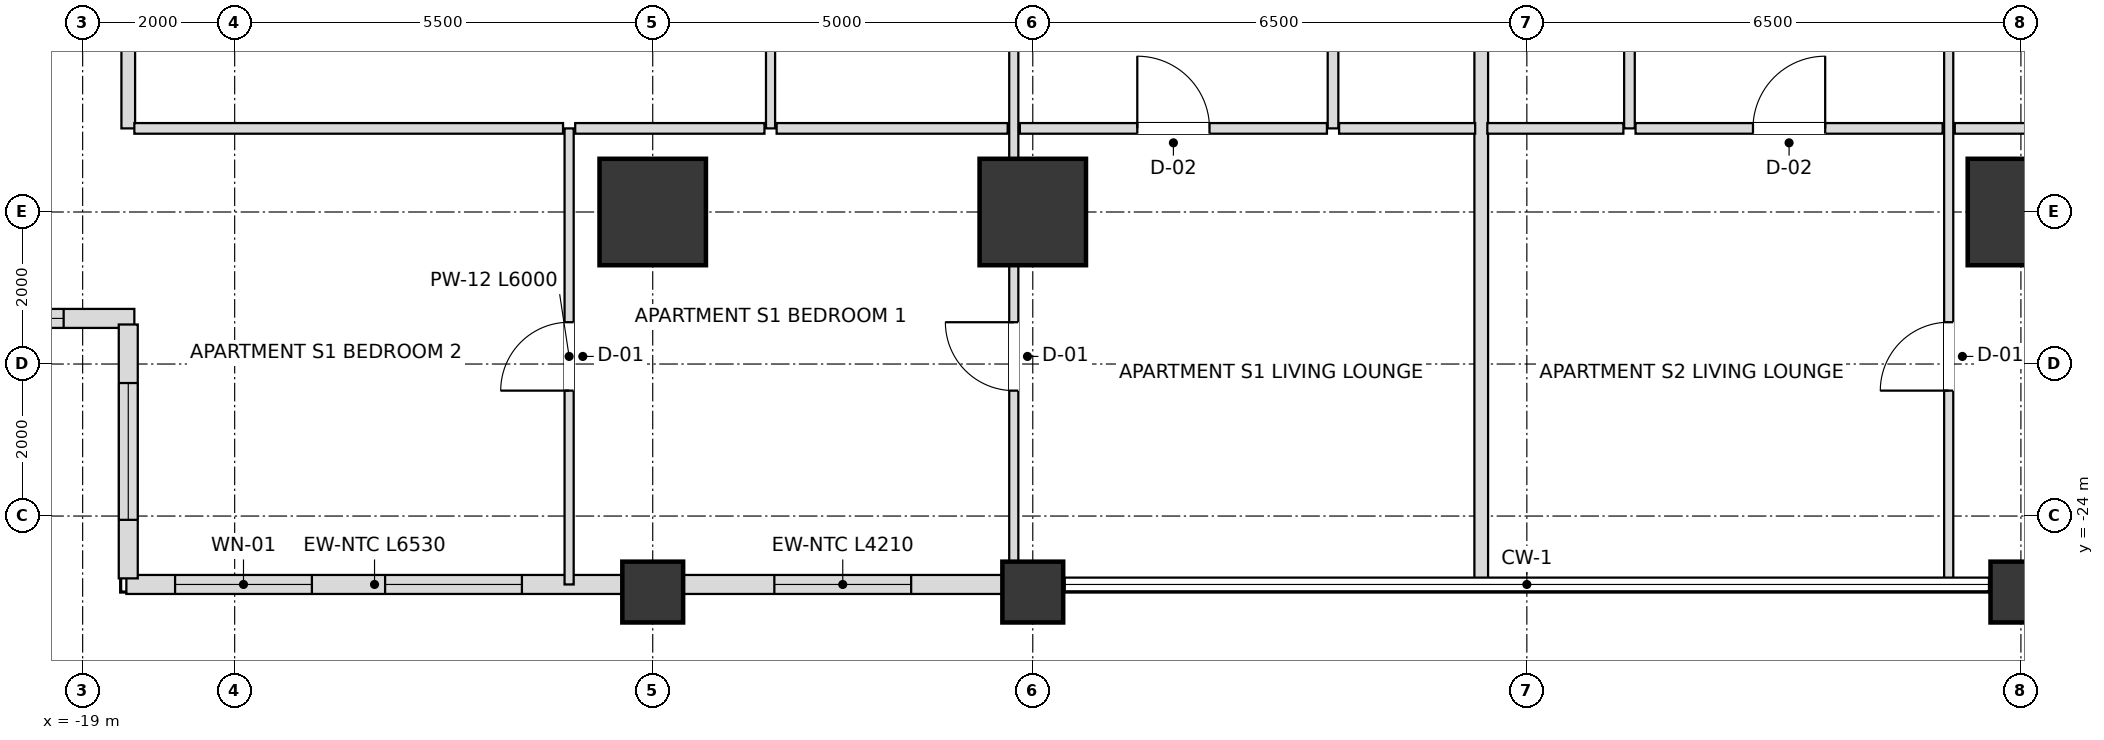
"""IFC4 building model, lengths in metres.
Left out: names, types, materials, properties, quantities, classifications, styles, units other than length and angle.
Written with IfcOpenShell. Run it as: python <this file> out.ifc"""

import sys

from ifc_helpers import new_model, si_unit, direction, frame, frame_2d, origin, origin_2d, place, context, subcontext, project, spatial, rectangle, extrude, element, fill, save


model = new_model("IFC4")
c1 = context("Model", 3, precision=1e-05, world=origin(), true_north=direction((0.0, 1.0)))
c2 = subcontext(c1, "Body", "Model", "MODEL_VIEW")
j1 = project(units=[si_unit("LENGTHUNIT", "METRE"), si_unit("PLANEANGLEUNIT", "RADIAN")], contexts=[c1])
p1 = place(None, origin())
s1 = spatial("IfcSite", under=j1, at=p1, CompositionType="ELEMENT")
p2 = place(p1, origin())
s2 = spatial("IfcBuilding", under=s1, at=p2, CompositionType="ELEMENT")
p3 = place(p2, frame((0.0, 0.0, 68.4)))
s3 = spatial("IfcBuildingStorey", under=s2, at=p3, CompositionType="ELEMENT", Elevation=68.4)
for number, where, z_axis, x_axis in (
    (1, (-11.5, -20.0, 0.0), (0.0, 0.0, 1.0), (1.0, 0.0, 0.0)),
    (2, (-6.5, -20.0, 0.0), (0.0, 0.0, 1.0), (1.0, 0.0, 0.0)),
    (3, (6.5, -20.0, 0.0), (0.0, 0.0, 1.0), (1.0, 0.0, 0.0)),
):
    element("IfcColumn", number, at=place(p3, frame(where, z_axis=z_axis, x_axis=x_axis)), inside=s3, PredefinedType="USERDEFINED", context=c2, shape_type="SweptSolid", body=[
        extrude(rectangle(XDim=1.4, YDim=1.4, at=origin_2d()), origin(), (0.0, 0.0, 1.0), 3.6),
    ])
for number, where, z_axis, x_axis in (
    (4, (-11.5, -25.0, 0.0), (0.0, 0.0, 1.0), (1.0, 0.0, 0.0)),
    (5, (-6.5, -25.0, 0.0), (0.0, 0.0, 1.0), (1.0, 0.0, 0.0)),
    (6, (6.5, -25.0, 0.0), (0.0, 0.0, 1.0), (1.0, 0.0, 0.0)),
):
    element("IfcColumn", number, at=place(p3, frame(where, z_axis=z_axis, x_axis=x_axis)), inside=s3, PredefinedType="COLUMN", context=c2, shape_type="SweptSolid", body=[
        extrude(rectangle(XDim=0.8, YDim=0.8, at=origin_2d()), origin(), (0.0, 0.0, 1.0), 3.6),
    ])
p4 = place(p3, frame((-18.425, -24.9, 0.0), z_axis=(0.0, 0.0, 1.0), x_axis=(1.0, 0.0, 0.0)))
e7 = element("IfcWall", 7, at=p4, inside=s3, PredefinedType="SOLIDWALL", context=c2, shape_type="SweptSolid", body=[
    extrude(rectangle(XDim=6.53, YDim=0.25, at=frame_2d((3.265, 0.0))), origin(), (0.0, 0.0, 1.0), 2.736),
])
p5 = place(p4, frame((0.641, 0.0, 0.72)))
e8 = element("IfcOpeningElement", 8, at=p5, cuts=e7, PredefinedType="OPENING", context=c2, shape_type="SweptSolid", body=[
    extrude(rectangle(XDim=1.8, YDim=1.68, at=frame_2d((0.9, 0.84))), frame((0.0, 0.135, 0.0), z_axis=(0.0, -1.0, 0.0), x_axis=(1.0, 0.0, 0.0)), (0.0, 0.0, 1.0), 0.27),
])
p6 = place(p4, frame((3.404, 0.0, 0.72)))
e9 = element("IfcOpeningElement", 9, at=p6, cuts=e7, PredefinedType="OPENING", context=c2, shape_type="SweptSolid", body=[
    extrude(rectangle(XDim=1.8, YDim=1.68, at=frame_2d((0.9, 0.84))), frame((0.0, 0.135, 0.0), z_axis=(0.0, -1.0, 0.0), x_axis=(1.0, 0.0, 0.0)), (0.0, 0.0, 1.0), 0.27),
])
p7 = place(p3, frame((-11.105, -24.9, 0.0), z_axis=(0.0, 0.0, 1.0), x_axis=(1.0, 0.0, 0.0)))
e10 = element("IfcWall", 10, at=p7, inside=s3, PredefinedType="SOLIDWALL", context=c2, shape_type="SweptSolid", body=[
    extrude(rectangle(XDim=4.21, YDim=0.25, at=frame_2d((2.105, 0.0))), origin(), (0.0, 0.0, 1.0), 2.736),
])
p8 = place(p7, frame((1.205, 0.0, 0.72)))
e11 = element("IfcOpeningElement", 11, at=p8, cuts=e10, PredefinedType="OPENING", context=c2, shape_type="SweptSolid", body=[
    extrude(rectangle(XDim=1.8, YDim=1.68, at=frame_2d((0.9, 0.84))), frame((0.0, 0.135, 0.0), z_axis=(0.0, -1.0, 0.0), x_axis=(1.0, 0.0, 0.0)), (0.0, 0.0, 1.0), 0.27),
])
p9 = place(p3, frame((-21.98, -21.4, 0.0), z_axis=(0.0, 0.0, 1.0), x_axis=(1.0, 0.0, 0.0)))
e12 = element("IfcWall", 12, at=p9, inside=s3, PredefinedType="SOLIDWALL", context=c2, shape_type="SweptSolid", body=[
    extrude(rectangle(XDim=3.66, YDim=0.25, at=frame_2d((1.83, 0.0))), origin(), (0.0, 0.0, 1.0), 2.736),
])
p10 = place(p9, frame((0.93, 0.0, 0.72)))
e13 = element("IfcOpeningElement", 13, at=p10, cuts=e12, PredefinedType="OPENING", context=c2, shape_type="SweptSolid", body=[
    extrude(rectangle(XDim=1.8, YDim=1.68, at=frame_2d((0.9, 0.84))), frame((0.0, 0.135, 0.0), z_axis=(0.0, -1.0, 0.0), x_axis=(1.0, 0.0, 0.0)), (0.0, 0.0, 1.0), 0.27),
])
p11 = place(p3, frame((-18.4, -21.48, 0.0), z_axis=(0.0, 0.0, 1.0), x_axis=(0.0, -1.0, 0.0)))
e14 = element("IfcWall", 14, at=p11, inside=s3, PredefinedType="SOLIDWALL", context=c2, shape_type="SweptSolid", body=[
    extrude(rectangle(XDim=3.34, YDim=0.25, at=frame_2d((1.67, 0.0))), origin(), (0.0, 0.0, 1.0), 2.736),
])
p12 = place(p11, frame((0.77, 0.0, 0.72)))
e15 = element("IfcOpeningElement", 15, at=p12, cuts=e14, PredefinedType="OPENING", context=c2, shape_type="SweptSolid", body=[
    extrude(rectangle(XDim=1.8, YDim=1.68, at=frame_2d((0.9, 0.84))), frame((0.0, 0.135, 0.0), z_axis=(0.0, -1.0, 0.0), x_axis=(1.0, 0.0, 0.0)), (0.0, 0.0, 1.0), 0.27),
])
p13 = place(p3, frame((-18.4, -18.9, 0.0), z_axis=(0.0, 0.0, 1.0), x_axis=(0.0, 1.0, 0.0)))
e16 = element("IfcWall", 16, at=p13, inside=s3, PredefinedType="PARTITIONING", context=c2, shape_type="SweptSolid", body=[
    extrude(rectangle(XDim=9.6, YDim=0.18, at=frame_2d((4.8, 0.0))), origin(), (0.0, 0.0, 1.0), 2.736),
])
p14 = place(p3, frame((-12.6, -24.9, 0.0), z_axis=(0.0, 0.0, 1.0), x_axis=(0.0, 1.0, 0.0)))
e17 = element("IfcWall", 17, at=p14, inside=s3, PredefinedType="PARTITIONING", context=c2, shape_type="SweptSolid", body=[
    extrude(rectangle(XDim=6.0, YDim=0.12, at=frame_2d((3.0, 0.0))), origin(), (0.0, 0.0, 1.0), 2.736),
])
p15 = place(p14, frame((2.55, 0.0, 0.0)))
e18 = element("IfcOpeningElement", 18, at=p15, cuts=e17, PredefinedType="OPENING", context=c2, shape_type="SweptSolid", body=[
    extrude(rectangle(XDim=0.9, YDim=2.1, at=frame_2d((0.45, 1.05))), frame((0.0, 0.07, 0.0), z_axis=(0.0, -1.0, 0.0), x_axis=(1.0, 0.0, 0.0)), (0.0, 0.0, 1.0), 0.14),
])
p16 = place(p3, frame((-9.95, -18.9, 0.0), z_axis=(0.0, 0.0, 1.0), x_axis=(0.0, 1.0, 0.0)))
e19 = element("IfcWall", 19, at=p16, inside=s3, PredefinedType="PARTITIONING", context=c2, shape_type="SweptSolid", body=[
    extrude(rectangle(XDim=9.6, YDim=0.12, at=frame_2d((4.8, 0.0))), origin(), (0.0, 0.0, 1.0), 2.816),
])
p17 = place(p16, frame((4.35, 0.0, 0.0)))
e20 = element("IfcOpeningElement", 20, at=p17, cuts=e19, PredefinedType="OPENING", context=c2, shape_type="SweptSolid", body=[
    extrude(rectangle(XDim=0.9, YDim=2.1, at=frame_2d((0.45, 1.05))), frame((0.0, 0.07, 0.0), z_axis=(0.0, -1.0, 0.0), x_axis=(1.0, 0.0, 0.0)), (0.0, 0.0, 1.0), 0.14),
])
p18 = place(p3, frame((-6.75, -24.9, 0.0), z_axis=(0.0, 0.0, 1.0), x_axis=(0.0, 1.0, 0.0)))
e21 = element("IfcWall", 21, at=p18, inside=s3, PredefinedType="PARTITIONING", context=c2, shape_type="SweptSolid", body=[
    extrude(rectangle(XDim=15.6, YDim=0.12, at=frame_2d((7.8, 0.0))), origin(), (0.0, 0.0, 1.0), 2.816),
])
p19 = place(p18, frame((10.325, 0.0, 0.0)))
e22 = element("IfcOpeningElement", 22, at=p19, cuts=e21, PredefinedType="OPENING", context=c2, shape_type="SweptSolid", body=[
    extrude(rectangle(XDim=0.95, YDim=2.1, at=frame_2d((0.475, 1.05))), frame((0.0, 0.07, 0.0), z_axis=(0.0, -1.0, 0.0), x_axis=(1.0, 0.0, 0.0)), (0.0, 0.0, 1.0), 0.14),
])
p20 = place(p18, frame((2.55, 0.0, 0.0)))
e23 = element("IfcOpeningElement", 23, at=p20, cuts=e21, PredefinedType="OPENING", context=c2, shape_type="SweptSolid", body=[
    extrude(rectangle(XDim=0.9, YDim=2.1, at=frame_2d((0.45, 1.05))), frame((0.0, 0.07, 0.0), z_axis=(0.0, -1.0, 0.0), x_axis=(1.0, 0.0, 0.0)), (0.0, 0.0, 1.0), 0.14),
])
p21 = place(p3, frame((-2.55, -18.9, 0.0), z_axis=(0.0, 0.0, 1.0), x_axis=(0.0, 1.0, 0.0)))
e24 = element("IfcWall", 24, at=p21, inside=s3, PredefinedType="PARTITIONING", context=c2, shape_type="SweptSolid", body=[
    extrude(rectangle(XDim=9.6, YDim=0.14, at=frame_2d((4.8, 0.0))), origin(), (0.0, 0.0, 1.0), 2.948),
])
p22 = place(p21, frame((4.35, 0.0, 0.0)))
e25 = element("IfcOpeningElement", 25, at=p22, cuts=e24, PredefinedType="OPENING", context=c2, shape_type="SweptSolid", body=[
    extrude(rectangle(XDim=0.9, YDim=2.1, at=frame_2d((0.45, 1.05))), frame((0.0, 0.08, 0.0), z_axis=(0.0, -1.0, 0.0), x_axis=(1.0, 0.0, 0.0)), (0.0, 0.0, 1.0), 0.16),
])
p23 = place(p3, frame((-0.6, -24.9, 0.0), z_axis=(0.0, 0.0, 1.0), x_axis=(0.0, 1.0, 0.0)))
e26 = element("IfcWall", 26, at=p23, inside=s3, PredefinedType="PARTITIONING", context=c2, shape_type="SweptSolid", body=[
    extrude(rectangle(XDim=15.6, YDim=0.18, at=frame_2d((7.8, 0.0))), origin(), (0.0, 0.0, 1.0), 2.816),
])
p24 = place(p3, frame((1.35, -18.9, 0.0), z_axis=(0.0, 0.0, 1.0), x_axis=(0.0, 1.0, 0.0)))
e27 = element("IfcWall", 27, at=p24, inside=s3, PredefinedType="PARTITIONING", context=c2, shape_type="SweptSolid", body=[
    extrude(rectangle(XDim=9.6, YDim=0.14, at=frame_2d((4.8, 0.0))), origin(), (0.0, 0.0, 1.0), 2.948),
])
p25 = place(p24, frame((4.35, 0.0, 0.0)))
e28 = element("IfcOpeningElement", 28, at=p25, cuts=e27, PredefinedType="OPENING", context=c2, shape_type="SweptSolid", body=[
    extrude(rectangle(XDim=0.9, YDim=2.1, at=frame_2d((0.45, 1.05))), frame((0.0, 0.08, 0.0), z_axis=(0.0, -1.0, 0.0), x_axis=(1.0, 0.0, 0.0)), (0.0, 0.0, 1.0), 0.16),
])
p26 = place(p3, frame((5.55, -24.9, 0.0), z_axis=(0.0, 0.0, 1.0), x_axis=(0.0, 1.0, 0.0)))
e29 = element("IfcWall", 29, at=p26, inside=s3, PredefinedType="PARTITIONING", context=c2, shape_type="SweptSolid", body=[
    extrude(rectangle(XDim=15.6, YDim=0.12, at=frame_2d((7.8, 0.0))), origin(), (0.0, 0.0, 1.0), 2.816),
])
p27 = place(p26, frame((10.325, 0.0, 0.0)))
e30 = element("IfcOpeningElement", 30, at=p27, cuts=e29, PredefinedType="OPENING", context=c2, shape_type="SweptSolid", body=[
    extrude(rectangle(XDim=0.95, YDim=2.1, at=frame_2d((0.475, 1.05))), frame((0.0, 0.07, 0.0), z_axis=(0.0, -1.0, 0.0), x_axis=(1.0, 0.0, 0.0)), (0.0, 0.0, 1.0), 0.14),
])
p28 = place(p26, frame((2.55, 0.0, 0.0)))
e31 = element("IfcOpeningElement", 31, at=p28, cuts=e29, PredefinedType="OPENING", context=c2, shape_type="SweptSolid", body=[
    extrude(rectangle(XDim=0.9, YDim=2.1, at=frame_2d((0.45, 1.05))), frame((0.0, 0.07, 0.0), z_axis=(0.0, -1.0, 0.0), x_axis=(1.0, 0.0, 0.0)), (0.0, 0.0, 1.0), 0.14),
])
p29 = place(p3, frame((-18.32, -18.9, 0.0), z_axis=(0.0, 0.0, 1.0), x_axis=(1.0, 0.0, 0.0)))
e32 = element("IfcWall", 32, at=p29, inside=s3, PredefinedType="PARTITIONING", context=c2, shape_type="SweptSolid", body=[
    extrude(rectangle(XDim=5.64, YDim=0.14, at=frame_2d((2.82, 0.0))), origin(), (0.0, 0.0, 1.0), 2.736),
])
p30 = place(p3, frame((-12.52, -18.9, 0.0), z_axis=(0.0, 0.0, 1.0), x_axis=(1.0, 0.0, 0.0)))
e33 = element("IfcWall", 33, at=p30, inside=s3, PredefinedType="PARTITIONING", context=c2, shape_type="SweptSolid", body=[
    extrude(rectangle(XDim=2.49, YDim=0.14, at=frame_2d((1.245, 0.0))), origin(), (0.0, 0.0, 1.0), 2.736),
])
p31 = place(p3, frame((-9.87, -18.9, 0.0), z_axis=(0.0, 0.0, 1.0), x_axis=(1.0, 0.0, 0.0)))
e34 = element("IfcWall", 34, at=p31, inside=s3, PredefinedType="PARTITIONING", context=c2, shape_type="SweptSolid", body=[
    extrude(rectangle(XDim=3.04, YDim=0.14, at=frame_2d((1.52, 0.0))), origin(), (0.0, 0.0, 1.0), 3.38),
])
p32 = place(p3, frame((-6.67, -18.9, 0.0), z_axis=(0.0, 0.0, 1.0), x_axis=(1.0, 0.0, 0.0)))
e35 = element("IfcWall", 35, at=p32, inside=s3, PredefinedType="PARTITIONING", context=c2, shape_type="SweptSolid", body=[
    extrude(rectangle(XDim=4.04, YDim=0.14, at=frame_2d((2.02, 0.0))), origin(), (0.0, 0.0, 1.0), 2.816),
])
p33 = place(p32, frame((1.545, 0.0, 0.0)))
e36 = element("IfcOpeningElement", 36, at=p33, cuts=e35, PredefinedType="OPENING", context=c2, shape_type="SweptSolid", body=[
    extrude(rectangle(XDim=0.95, YDim=2.1, at=frame_2d((0.475, 1.05))), frame((0.0, 0.08, 0.0), z_axis=(0.0, -1.0, 0.0), x_axis=(1.0, 0.0, 0.0)), (0.0, 0.0, 1.0), 0.16),
])
for number, where, z_axis, x_axis in (
    (37, (-2.47, -18.9, 0.0), (0.0, 0.0, 1.0), (1.0, 0.0, 0.0)),
    (38, (-0.52, -18.9, 0.0), (0.0, 0.0, 1.0), (1.0, 0.0, 0.0)),
):
    element("IfcWall", number, at=place(p3, frame(where, z_axis=z_axis, x_axis=x_axis)), inside=s3, PredefinedType="PARTITIONING", context=c2, shape_type="SweptSolid", body=[
        extrude(rectangle(XDim=1.79, YDim=0.14, at=frame_2d((0.895, 0.0))), origin(), (0.0, 0.0, 1.0), 3.38),
    ])
p34 = place(p3, frame((1.43, -18.9, 0.0), z_axis=(0.0, 0.0, 1.0), x_axis=(1.0, 0.0, 0.0)))
e39 = element("IfcWall", 39, at=p34, inside=s3, PredefinedType="PARTITIONING", context=c2, shape_type="SweptSolid", body=[
    extrude(rectangle(XDim=4.04, YDim=0.14, at=frame_2d((2.02, 0.0))), origin(), (0.0, 0.0, 1.0), 3.38),
])
p35 = place(p34, frame((1.545, 0.0, 0.0)))
e40 = element("IfcOpeningElement", 40, at=p35, cuts=e39, PredefinedType="OPENING", context=c2, shape_type="SweptSolid", body=[
    extrude(rectangle(XDim=0.95, YDim=2.1, at=frame_2d((0.475, 1.05))), frame((0.0, 0.08, 0.0), z_axis=(0.0, -1.0, 0.0), x_axis=(1.0, 0.0, 0.0)), (0.0, 0.0, 1.0), 0.16),
])
p36 = place(p3, frame((5.63, -18.9, 0.0), z_axis=(0.0, 0.0, 1.0), x_axis=(1.0, 0.0, 0.0)))
e41 = element("IfcWall", 41, at=p36, inside=s3, PredefinedType="PARTITIONING", context=c2, shape_type="SweptSolid", body=[
    extrude(rectangle(XDim=3.04, YDim=0.14, at=frame_2d((1.52, 0.0))), origin(), (0.0, 0.0, 1.0), 2.816),
])
p37 = place(p5, origin())
e42 = element("IfcWindow", 42, at=p37, inside=s3, PartitioningType="SINGLE_PANEL", PredefinedType="WINDOW", context=c2, shape_type="SweptSolid", body=[
    extrude(rectangle(XDim=1.8, YDim=1.68, at=frame_2d((0.9, 0.84))), frame((0.0, 0.03, 0.0), z_axis=(0.0, -1.0, 0.0), x_axis=(1.0, 0.0, 0.0)), (0.0, 0.0, 1.0), 0.06),
])
fill(e8, e42)
p38 = place(p6, origin())
e43 = element("IfcWindow", 43, at=p38, inside=s3, PartitioningType="SINGLE_PANEL", PredefinedType="WINDOW", context=c2, shape_type="SweptSolid", body=[
    extrude(rectangle(XDim=1.8, YDim=1.68, at=frame_2d((0.9, 0.84))), frame((0.0, 0.03, 0.0), z_axis=(0.0, -1.0, 0.0), x_axis=(1.0, 0.0, 0.0)), (0.0, 0.0, 1.0), 0.06),
])
fill(e9, e43)
p39 = place(p8, origin())
e44 = element("IfcWindow", 44, at=p39, inside=s3, PartitioningType="SINGLE_PANEL", PredefinedType="WINDOW", context=c2, shape_type="SweptSolid", body=[
    extrude(rectangle(XDim=1.8, YDim=1.68, at=frame_2d((0.9, 0.84))), frame((0.0, 0.03, 0.0), z_axis=(0.0, -1.0, 0.0), x_axis=(1.0, 0.0, 0.0)), (0.0, 0.0, 1.0), 0.06),
])
fill(e11, e44)
p40 = place(p10, origin())
e45 = element("IfcWindow", 45, at=p40, inside=s3, PartitioningType="SINGLE_PANEL", PredefinedType="WINDOW", context=c2, shape_type="SweptSolid", body=[
    extrude(rectangle(XDim=1.8, YDim=1.68, at=frame_2d((0.9, 0.84))), frame((0.0, 0.03, 0.0), z_axis=(0.0, -1.0, 0.0), x_axis=(1.0, 0.0, 0.0)), (0.0, 0.0, 1.0), 0.06),
])
fill(e13, e45)
p41 = place(p12, origin())
e46 = element("IfcWindow", 46, at=p41, inside=s3, PartitioningType="SINGLE_PANEL", PredefinedType="WINDOW", context=c2, shape_type="SweptSolid", body=[
    extrude(rectangle(XDim=1.8, YDim=1.68, at=frame_2d((0.9, 0.84))), frame((0.0, 0.03, 0.0), z_axis=(0.0, -1.0, 0.0), x_axis=(1.0, 0.0, 0.0)), (0.0, 0.0, 1.0), 0.06),
])
fill(e15, e46)
p42 = place(p33, origin())
e47 = element("IfcDoor", 47, at=p42, inside=s3, OperationType="SINGLE_SWING_LEFT", PredefinedType="DOOR", context=c2, shape_type="SweptSolid", body=[
    extrude(rectangle(XDim=0.95, YDim=2.1, at=frame_2d((0.475, 1.05))), frame((0.0, 0.025, 0.0), z_axis=(0.0, -1.0, 0.0), x_axis=(1.0, 0.0, 0.0)), (0.0, 0.0, 1.0), 0.05),
])
fill(e36, e47)
p43 = place(p20, origin())
e48 = element("IfcDoor", 48, at=p43, inside=s3, OperationType="SINGLE_SWING_RIGHT", PredefinedType="DOOR", context=c2, shape_type="SweptSolid", body=[
    extrude(rectangle(XDim=0.9, YDim=2.1, at=frame_2d((0.45, 1.05))), frame((0.0, 0.025, 0.0), z_axis=(0.0, -1.0, 0.0), x_axis=(1.0, 0.0, 0.0)), (0.0, 0.0, 1.0), 0.05),
])
fill(e23, e48)
p44 = place(p15, origin())
e49 = element("IfcDoor", 49, at=p44, inside=s3, OperationType="SINGLE_SWING_LEFT", PredefinedType="DOOR", context=c2, shape_type="SweptSolid", body=[
    extrude(rectangle(XDim=0.9, YDim=2.1, at=frame_2d((0.45, 1.05))), frame((0.0, 0.025, 0.0), z_axis=(0.0, -1.0, 0.0), x_axis=(1.0, 0.0, 0.0)), (0.0, 0.0, 1.0), 0.05),
])
fill(e18, e49)
p45 = place(p35, origin())
e50 = element("IfcDoor", 50, at=p45, inside=s3, OperationType="SINGLE_SWING_RIGHT", PredefinedType="DOOR", context=c2, shape_type="SweptSolid", body=[
    extrude(rectangle(XDim=0.95, YDim=2.1, at=frame_2d((0.475, 1.05))), frame((0.0, 0.025, 0.0), z_axis=(0.0, -1.0, 0.0), x_axis=(1.0, 0.0, 0.0)), (0.0, 0.0, 1.0), 0.05),
])
fill(e40, e50)
p46 = place(p28, origin())
e51 = element("IfcDoor", 51, at=p46, inside=s3, OperationType="SINGLE_SWING_LEFT", PredefinedType="DOOR", context=c2, shape_type="SweptSolid", body=[
    extrude(rectangle(XDim=0.9, YDim=2.1, at=frame_2d((0.45, 1.05))), frame((0.0, 0.025, 0.0), z_axis=(0.0, -1.0, 0.0), x_axis=(1.0, 0.0, 0.0)), (0.0, 0.0, 1.0), 0.05),
])
fill(e31, e51)
save(model, sys.argv[1])
